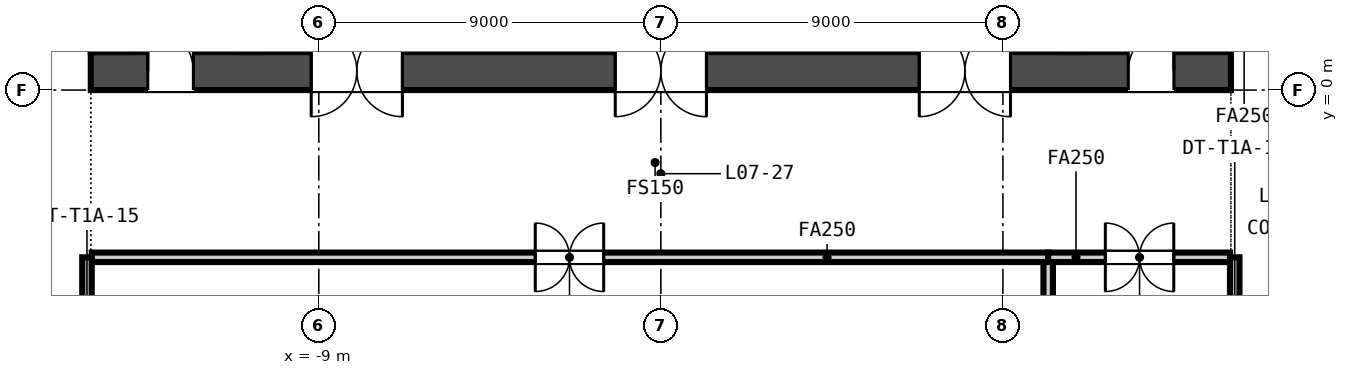
"""IFC4 building model, lengths in metres.
Left out: names, types, materials, properties, quantities, classifications, styles, units other than length and angle.
Written with IfcOpenShell. Run it as: python <this file> out.ifc"""

import sys

from ifc_helpers import new_model, si_unit, direction, frame, frame_2d, origin, place, context, subcontext, project, spatial, rectangle, extrude, element, fill, save


model = new_model("IFC4")
c1 = context("Model", 3, precision=1e-05, world=origin(), true_north=direction((0.0, 1.0)))
c2 = subcontext(c1, "Body", "Model", "MODEL_VIEW")
j1 = project(units=[si_unit("LENGTHUNIT", "METRE"), si_unit("PLANEANGLEUNIT", "RADIAN")], contexts=[c1])
p1 = place(None, origin())
s1 = spatial("IfcSite", under=j1, at=p1, CompositionType="ELEMENT")
p2 = place(p1, origin())
s2 = spatial("IfcBuilding", under=s1, at=p2, CompositionType="ELEMENT")
p3 = place(p2, frame((0.0, 0.0, 39.65)))
s3 = spatial("IfcBuildingStorey", under=s2, at=p3, CompositionType="ELEMENT", Elevation=39.65)
p4 = place(p3, frame((-15.0, 0.5, -0.15), z_axis=(0.0, 0.0, 1.0), x_axis=(1.0, 0.0, 0.0)))
e1 = element("IfcWall", 1, at=p4, inside=s3, PredefinedType="SOLIDWALL", context=c2, shape_type="SweptSolid", body=[
    extrude(rectangle(XDim=30.0, YDim=1.0, at=frame_2d((15.0, 0.0))), origin(), (0.0, 0.0, 1.0), 3.65),
])
p5 = place(p4, frame((5.8, 0.0, 0.15)))
e2 = element("IfcOpeningElement", 2, at=p5, cuts=e1, PredefinedType="OPENING", context=c2, shape_type="SweptSolid", body=[
    extrude(rectangle(XDim=2.4, YDim=2.4, at=frame_2d((1.2, 1.2))), frame((0.0, 0.51, 0.0), z_axis=(0.0, -1.0, 0.0), x_axis=(1.0, 0.0, 0.0)), (0.0, 0.0, 1.0), 1.02),
])
p6 = place(p4, frame((13.8, 0.0, 0.15)))
e3 = element("IfcOpeningElement", 3, at=p6, cuts=e1, PredefinedType="OPENING", context=c2, shape_type="SweptSolid", body=[
    extrude(rectangle(XDim=2.4, YDim=2.4, at=frame_2d((1.2, 1.2))), frame((0.0, 0.51, 0.0), z_axis=(0.0, -1.0, 0.0), x_axis=(1.0, 0.0, 0.0)), (0.0, 0.0, 1.0), 1.02),
])
p7 = place(p4, frame((21.8, 0.0, 0.15)))
e4 = element("IfcOpeningElement", 4, at=p7, cuts=e1, PredefinedType="OPENING", context=c2, shape_type="SweptSolid", body=[
    extrude(rectangle(XDim=2.4, YDim=2.4, at=frame_2d((1.2, 1.2))), frame((0.0, 0.51, 0.0), z_axis=(0.0, -1.0, 0.0), x_axis=(1.0, 0.0, 0.0)), (0.0, 0.0, 1.0), 1.02),
])
p8 = place(p4, frame((1.5, 0.0, 0.15)))
e5 = element("IfcOpeningElement", 5, at=p8, cuts=e1, PredefinedType="OPENING", context=c2, shape_type="SweptSolid", body=[
    extrude(rectangle(XDim=1.2, YDim=2.1, at=frame_2d((0.6, 1.05))), frame((0.0, 0.51, 0.0), z_axis=(0.0, -1.0, 0.0), x_axis=(1.0, 0.0, 0.0)), (0.0, 0.0, 1.0), 1.02),
])
p9 = place(p4, frame((27.3, 0.0, 0.15)))
e6 = element("IfcOpeningElement", 6, at=p9, cuts=e1, PredefinedType="OPENING", context=c2, shape_type="SweptSolid", body=[
    extrude(rectangle(XDim=1.2, YDim=2.1, at=frame_2d((0.6, 1.05))), frame((0.0, 0.51, 0.0), z_axis=(0.0, -1.0, 0.0), x_axis=(1.0, 0.0, 0.0)), (0.0, 0.0, 1.0), 1.02),
])
p10 = place(p3, frame((10.192, -4.4, 0.0), z_axis=(0.0, 0.0, 1.0), x_axis=(-1.0, 0.0, 0.0)))
e7 = element("IfcWall", 7, at=p10, inside=s3, PredefinedType="PARTITIONING", context=c2, shape_type="SweptSolid", body=[
    extrude(rectangle(XDim=25.167, YDim=0.25, at=frame_2d((12.583, 0.0))), origin(), (0.0, 0.0, 1.0), 2.741),
])
p11 = place(p10, frame((11.696, 0.0, 0.0)))
e8 = element("IfcOpeningElement", 8, at=p11, cuts=e7, PredefinedType="OPENING", context=c2, shape_type="SweptSolid", body=[
    extrude(rectangle(XDim=1.8, YDim=2.1, at=frame_2d((0.9, 1.05))), frame((0.0, 0.135, 0.0), z_axis=(0.0, -1.0, 0.0), x_axis=(1.0, 0.0, 0.0)), (0.0, 0.0, 1.0), 0.27),
])
p12 = place(p3, frame((14.975, -4.4, 0.0), z_axis=(0.0, 0.0, 1.0), x_axis=(-1.0, 0.0, 0.0)))
e9 = element("IfcWall", 9, at=p12, inside=s3, PredefinedType="PARTITIONING", context=c2, shape_type="SweptSolid", body=[
    extrude(rectangle(XDim=4.783, YDim=0.25, at=frame_2d((2.392, 0.0))), origin(), (0.0, 0.0, 1.0), 2.741),
])
p13 = place(p12, frame((1.479, 0.0, 0.0)))
e10 = element("IfcOpeningElement", 10, at=p13, cuts=e9, PredefinedType="OPENING", context=c2, shape_type="SweptSolid", body=[
    extrude(rectangle(XDim=1.8, YDim=2.1, at=frame_2d((0.9, 1.05))), frame((0.0, 0.135, 0.0), z_axis=(0.0, -1.0, 0.0), x_axis=(1.0, 0.0, 0.0)), (0.0, 0.0, 1.0), 0.27),
])
p14 = place(p3, frame((-15.1, -4.4, 0.0), z_axis=(0.0, 0.0, 1.0), x_axis=(0.0, -1.0, 0.0)))
e11 = element("IfcWall", 11, at=p14, inside=s3, PredefinedType="PARTITIONING", context=c2, shape_type="SweptSolid", body=[
    extrude(rectangle(XDim=7.875, YDim=0.25, at=frame_2d((3.938, 0.0))), origin(), (0.0, 0.0, 1.0), 2.741),
])
p15 = place(p14, frame((3.038, 0.0, 0.0)))
e12 = element("IfcOpeningElement", 12, at=p15, cuts=e11, PredefinedType="OPENING", context=c2, shape_type="SweptSolid", body=[
    extrude(rectangle(XDim=1.8, YDim=2.1, at=frame_2d((0.9, 1.05))), frame((0.0, 0.135, 0.0), z_axis=(0.0, -1.0, 0.0), x_axis=(1.0, 0.0, 0.0)), (0.0, 0.0, 1.0), 0.27),
])
p16 = place(p3, frame((10.192, -29.22, 0.0), z_axis=(0.0, 0.0, 1.0), x_axis=(0.0, 1.0, 0.0)))
e13 = element("IfcWall", 13, at=p16, inside=s3, PredefinedType="PARTITIONING", context=c2, shape_type="SweptSolid", body=[
    extrude(rectangle(XDim=24.695, YDim=0.25, at=frame_2d((12.348, 0.0))), origin(), (0.0, 0.0, 1.0), 2.741),
])
p17 = place(p3, frame((15.1, -12.275, 0.0), z_axis=(0.0, 0.0, 1.0), x_axis=(0.0, 1.0, 0.0)))
e14 = element("IfcWall", 14, at=p17, inside=s3, PredefinedType="PARTITIONING", context=c2, shape_type="SweptSolid", body=[
    extrude(rectangle(XDim=7.875, YDim=0.25, at=frame_2d((3.938, 0.0))), origin(), (0.0, 0.0, 1.0), 2.741),
])
p18 = place(p17, frame((3.038, 0.0, 0.0)))
e15 = element("IfcOpeningElement", 15, at=p18, cuts=e14, PredefinedType="OPENING", context=c2, shape_type="SweptSolid", body=[
    extrude(rectangle(XDim=1.8, YDim=2.1, at=frame_2d((0.9, 1.05))), frame((0.0, 0.135, 0.0), z_axis=(0.0, -1.0, 0.0), x_axis=(1.0, 0.0, 0.0)), (0.0, 0.0, 1.0), 0.27),
])
p19 = place(p5, origin())
e16 = element("IfcDoor", 16, at=p19, inside=s3, OperationType="DOUBLE_DOOR_DOUBLE_SWING", PredefinedType="DOOR", context=c2, shape_type="SweptSolid", body=[
    extrude(rectangle(XDim=2.4, YDim=2.4, at=frame_2d((1.2, 1.2))), frame((0.0, 0.025, 0.0), z_axis=(0.0, -1.0, 0.0), x_axis=(1.0, 0.0, 0.0)), (0.0, 0.0, 1.0), 0.05),
])
fill(e2, e16)
p20 = place(p6, origin())
e17 = element("IfcDoor", 17, at=p20, inside=s3, OperationType="DOUBLE_DOOR_DOUBLE_SWING", PredefinedType="DOOR", context=c2, shape_type="SweptSolid", body=[
    extrude(rectangle(XDim=2.4, YDim=2.4, at=frame_2d((1.2, 1.2))), frame((0.0, 0.025, 0.0), z_axis=(0.0, -1.0, 0.0), x_axis=(1.0, 0.0, 0.0)), (0.0, 0.0, 1.0), 0.05),
])
fill(e3, e17)
p21 = place(p7, origin())
e18 = element("IfcDoor", 18, at=p21, inside=s3, OperationType="DOUBLE_DOOR_DOUBLE_SWING", PredefinedType="DOOR", context=c2, shape_type="SweptSolid", body=[
    extrude(rectangle(XDim=2.4, YDim=2.4, at=frame_2d((1.2, 1.2))), frame((0.0, 0.025, 0.0), z_axis=(0.0, -1.0, 0.0), x_axis=(1.0, 0.0, 0.0)), (0.0, 0.0, 1.0), 0.05),
])
fill(e4, e18)
p22 = place(p8, origin())
e19 = element("IfcDoor", 19, at=p22, inside=s3, OperationType="SINGLE_SWING_LEFT", PredefinedType="DOOR", context=c2, shape_type="SweptSolid", body=[
    extrude(rectangle(XDim=1.2, YDim=2.1, at=frame_2d((0.6, 1.05))), frame((0.0, 0.025, 0.0), z_axis=(0.0, -1.0, 0.0), x_axis=(1.0, 0.0, 0.0)), (0.0, 0.0, 1.0), 0.05),
])
fill(e5, e19)
p23 = place(p9, origin())
e20 = element("IfcDoor", 20, at=p23, inside=s3, OperationType="SINGLE_SWING_RIGHT", PredefinedType="DOOR", context=c2, shape_type="SweptSolid", body=[
    extrude(rectangle(XDim=1.2, YDim=2.1, at=frame_2d((0.6, 1.05))), frame((0.0, 0.025, 0.0), z_axis=(0.0, -1.0, 0.0), x_axis=(1.0, 0.0, 0.0)), (0.0, 0.0, 1.0), 0.05),
])
fill(e6, e20)
p24 = place(p11, origin())
e21 = element("IfcDoor", 21, at=p24, inside=s3, OperationType="DOUBLE_DOOR_DOUBLE_SWING", PredefinedType="DOOR", context=c2, shape_type="SweptSolid", body=[
    extrude(rectangle(XDim=1.8, YDim=2.1, at=frame_2d((0.9, 1.05))), frame((0.0, 0.025, 0.0), z_axis=(0.0, -1.0, 0.0), x_axis=(1.0, 0.0, 0.0)), (0.0, 0.0, 1.0), 0.05),
])
fill(e8, e21)
p25 = place(p13, origin())
e22 = element("IfcDoor", 22, at=p25, inside=s3, OperationType="DOUBLE_DOOR_DOUBLE_SWING", PredefinedType="DOOR", context=c2, shape_type="SweptSolid", body=[
    extrude(rectangle(XDim=1.8, YDim=2.1, at=frame_2d((0.9, 1.05))), frame((0.0, 0.025, 0.0), z_axis=(0.0, -1.0, 0.0), x_axis=(1.0, 0.0, 0.0)), (0.0, 0.0, 1.0), 0.05),
])
fill(e10, e22)
save(model, sys.argv[1])
